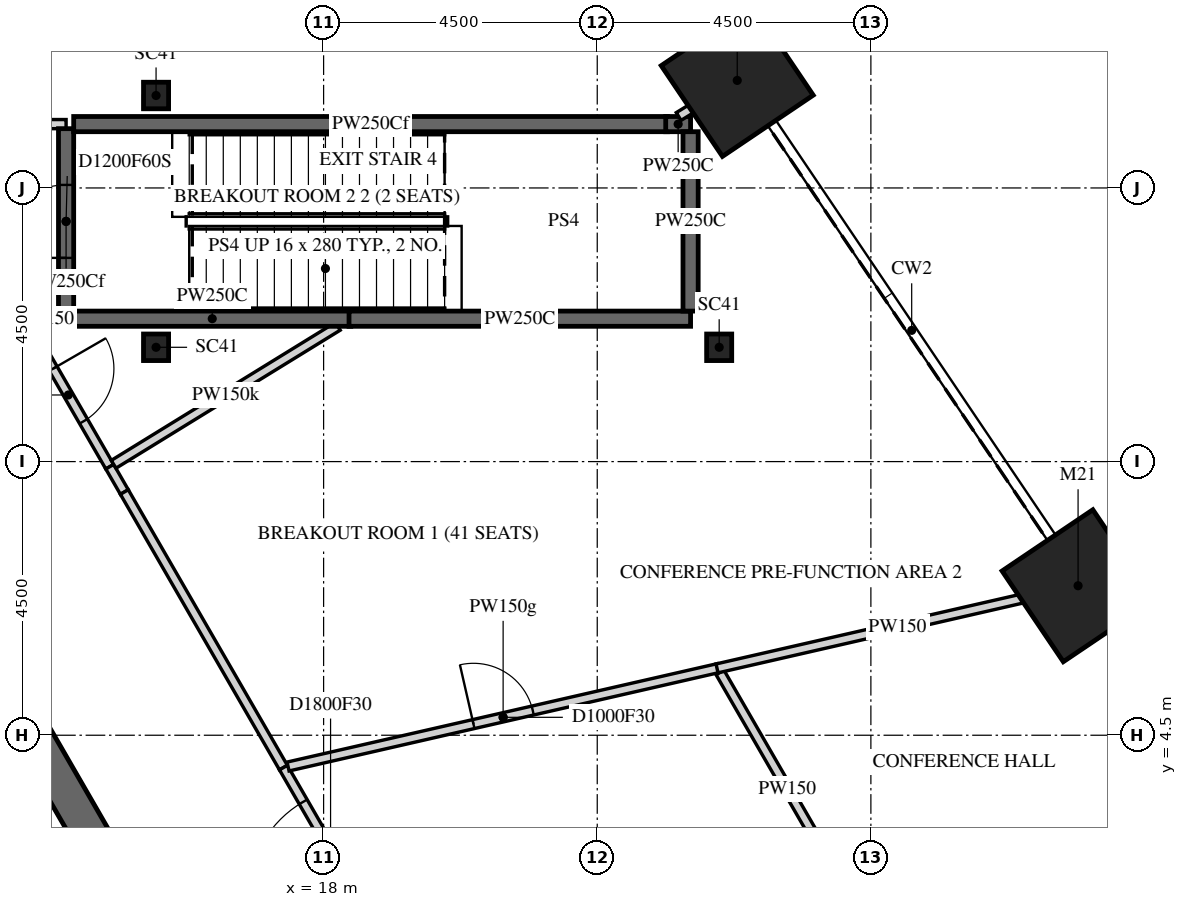
"""IFC4 building model, lengths in metres.
Left out: names, types, materials, properties, quantities, classifications, styles, units other than length and angle.
Written with IfcOpenShell. Run it as: python <this file> out.ifc"""

import sys

from ifc_helpers import new_model, si_unit, direction, frame, frame_2d, origin, origin_2d, place, context, subcontext, project, spatial, polyline, rectangle, i_section, outline, extrude, element, fill, save


model = new_model("IFC4")
c1 = context("Model", 3, precision=1e-05, world=origin(), true_north=direction((0.0, 1.0)))
c2 = subcontext(c1, "Body", "Model", "MODEL_VIEW")
j1 = project(units=[si_unit("LENGTHUNIT", "METRE"), si_unit("PLANEANGLEUNIT", "RADIAN")], contexts=[c1])
p1 = place(None, origin())
s1 = spatial("IfcSite", under=j1, at=p1, CompositionType="ELEMENT")
p2 = place(p1, origin())
s2 = spatial("IfcBuilding", under=s1, at=p2, CompositionType="ELEMENT")
p3 = place(p2, frame((0.0, 0.0, 20.5)))
s3 = spatial("IfcBuildingStorey", under=s2, at=p3, CompositionType="ELEMENT", Elevation=20.5)
for number, where, z_axis, x_axis in (
    (1, (30.407, 6.958, -0.25), (0.0, 0.0, 1.0), (0.559, -0.829, 0.0)),
    (2, (24.802, 15.269, -0.25), (0.0, 0.0, 1.0), (0.559, -0.829, 0.0)),
):
    element("IfcColumn", number, at=place(p3, frame(where, z_axis=z_axis, x_axis=x_axis)), inside=s3, PredefinedType="COLUMN", context=c2, shape_type="SweptSolid", body=[
        extrude(rectangle(XDim=1.8, YDim=1.8, at=origin_2d()), origin(), (0.0, 0.0, 1.0), 5.5),
    ])
for number, where, z_axis, x_axis in (
    (3, (24.505, 10.88, -0.25), (0.0, 0.0, 1.0), (1.0, 0.0, 0.0)),
    (4, (15.245, 10.88, -0.25), (0.0, 0.0, 1.0), (1.0, 0.0, 0.0)),
    (5, (15.245, 15.02, -0.25), (0.0, 0.0, 1.0), (1.0, 0.0, 0.0)),
):
    element("IfcColumn", number, at=place(p3, frame(where, z_axis=z_axis, x_axis=x_axis)), inside=s3, PredefinedType="COLUMN", context=c2, shape_type="SweptSolid", body=[
        extrude(i_section(OverallWidth=0.412, OverallDepth=0.437, WebThickness=0.036, FlangeThickness=0.058, FilletRadius=0.015, at=origin_2d()), origin(), (0.0, 0.0, 1.0), 5.5),
    ])
p4 = place(p3, frame((15.819, 0.0, -0.25), z_axis=(0.0, 0.0, 1.0), x_axis=(-0.499999880136, 0.866025472988, 0.0)))
e6 = element("IfcWall", 6, at=p4, inside=s3, PredefinedType="SHEAR", context=c2, shape_type="SweptSolid", body=[
    extrude(outline(polyline([(-0.173, -0.3), (15.993, -0.3), (15.646, 0.3), (0.173, 0.3), (-0.173, -0.3)])), origin(), (0.0, 0.0, 1.0), 5.5),
])
p5 = place(p4, frame((6.981, 0.0, 0.25)))
e7 = element("IfcOpeningElement", 7, at=p5, cuts=e6, PredefinedType="OPENING", context=c2, shape_type="SweptSolid", body=[
    extrude(rectangle(XDim=1.8, YDim=2.4, at=frame_2d((0.9, 1.2))), frame((0.0, 0.31, 0.0), z_axis=(0.0, -1.0, 0.0), x_axis=(1.0, 0.0, 0.0)), (0.0, 0.0, 1.0), 0.62),
])
p6 = place(p3, frame((11.836, 14.55, 0.0), z_axis=(0.0, 0.0, 1.0), x_axis=(1.0, 0.0, 0.0)))
e8 = element("IfcWall", 8, at=p6, inside=s3, PredefinedType="PARTITIONING", context=c2, shape_type="SweptSolid", body=[
    extrude(rectangle(XDim=1.929, YDim=0.15, at=frame_2d((0.964, 0.0))), origin(), (0.0, 0.0, 1.0), 5.25),
])
p7 = place(p6, frame((0.465, 0.0, 0.0)))
e9 = element("IfcOpeningElement", 9, at=p7, cuts=e8, PredefinedType="OPENING", context=c2, shape_type="SweptSolid", body=[
    extrude(rectangle(XDim=1.0, YDim=2.1, at=frame_2d((0.5, 1.05))), frame((0.0, 0.085, 0.0), z_axis=(0.0, -1.0, 0.0), x_axis=(1.0, 0.0, 0.0)), (0.0, 0.0, 1.0), 0.17),
])
p8 = place(p3, frame((13.765, 11.35, 0.0), z_axis=(0.0, 0.0, 1.0), x_axis=(-1.0, 0.0, 0.0)))
e10 = element("IfcWall", 10, at=p8, inside=s3, PredefinedType="PARTITIONING", context=c2, shape_type="SweptSolid", body=[
    extrude(rectangle(XDim=0.688, YDim=0.15, at=frame_2d((0.344, 0.0))), origin(), (0.0, 0.0, 1.0), 5.25),
])
p9 = place(p3, frame((13.765, 11.425, 0.0), z_axis=(0.0, 0.0, 1.0), x_axis=(0.0, 1.0, 0.0)))
e11 = element("IfcWall", 11, at=p9, inside=s3, PredefinedType="PARTITIONING", context=c2, shape_type="SweptSolid", body=[
    extrude(rectangle(XDim=3.05, YDim=0.25, at=frame_2d((1.525, 0.0))), origin(), (0.0, 0.0, 1.0), 4.496),
])
p10 = place(p9, frame((0.925, 0.0, 0.0)))
e12 = element("IfcOpeningElement", 12, at=p10, cuts=e11, PredefinedType="OPENING", context=c2, shape_type="SweptSolid", body=[
    extrude(rectangle(XDim=1.2, YDim=2.1, at=frame_2d((0.6, 1.05))), frame((0.0, 0.135, 0.0), z_axis=(0.0, -1.0, 0.0), x_axis=(1.0, 0.0, 0.0)), (0.0, 0.0, 1.0), 0.27),
])
p11 = place(p3, frame((13.89, 14.55, 0.0), z_axis=(0.0, 0.0, 1.0), x_axis=(1.0, 0.0, 0.0)))
e13 = element("IfcWall", 13, at=p11, inside=s3, PredefinedType="PARTITIONING", context=c2, shape_type="SweptSolid", body=[
    extrude(rectangle(XDim=9.765, YDim=0.25, at=frame_2d((4.883, 0.0))), origin(), (0.0, 0.0, 1.0), 4.496),
])
p12 = place(p3, frame((13.12, 11.275, 0.0), z_axis=(0.0, 0.0, 1.0), x_axis=(0.500177554253, -0.865922868517, 0.0)))
e14 = element("IfcWall", 14, at=p12, inside=s3, PredefinedType="PARTITIONING", context=c2, shape_type="SweptSolid", body=[
    extrude(rectangle(XDim=2.724, YDim=0.15, at=frame_2d((1.362, 0.0))), origin(), (0.0, 0.0, 1.0), 5.25),
])
p13 = place(p12, frame((0.862, 0.0, 0.0)))
e15 = element("IfcOpeningElement", 15, at=p13, cuts=e14, PredefinedType="OPENING", context=c2, shape_type="SweptSolid", body=[
    extrude(rectangle(XDim=1.0, YDim=2.1, at=frame_2d((0.5, 1.05))), frame((0.0, 0.085, 0.0), z_axis=(0.0, -1.0, 0.0), x_axis=(1.0, 0.0, 0.0)), (0.0, 0.0, 1.0), 0.17),
])
p14 = place(p3, frame((14.723, 8.5, 0.0), z_axis=(0.0, 0.0, 1.0), x_axis=(-0.499693115345, 0.866202511239, 0.0)))
e16 = element("IfcWall", 16, at=p14, inside=s3, PredefinedType="PARTITIONING", context=c2, shape_type="SweptSolid", body=[
    extrude(rectangle(XDim=0.48, YDim=0.15, at=frame_2d((0.24, 0.0))), origin(), (0.0, 0.0, 1.0), 5.25),
])
p15 = place(p3, frame((17.339, 3.968, 0.0), z_axis=(0.0, 0.0, 1.0), x_axis=(-0.499952654668, 0.866052736899, 0.0)))
e17 = element("IfcWall", 17, at=p15, inside=s3, PredefinedType="PARTITIONING", context=c2, shape_type="SweptSolid", body=[
    extrude(rectangle(XDim=5.233, YDim=0.15, at=frame_2d((2.616, 0.0))), origin(), (0.0, 0.0, 1.0), 5.25),
])
p16 = place(p3, frame((18.234, 11.225, 0.0), z_axis=(0.0, 0.0, 1.0), x_axis=(-0.851571181887, -0.524238993379, 0.0)))
e18 = element("IfcWall", 18, at=p16, inside=s3, PredefinedType="PARTITIONING", context=c2, shape_type="SweptSolid", body=[
    extrude(rectangle(XDim=4.33, YDim=0.15, at=frame_2d((2.165, 0.0))), origin(), (0.0, 0.0, 1.0), 4.323),
])
p17 = place(p3, frame((18.447, 11.35, 0.0), z_axis=(0.0, 0.0, 1.0), x_axis=(-1.0, 0.0, 0.0)))
e19 = element("IfcWall", 19, at=p17, inside=s3, PredefinedType="PARTITIONING", context=c2, shape_type="SweptSolid", body=[
    extrude(rectangle(XDim=4.557, YDim=0.25, at=frame_2d((2.279, 0.0))), origin(), (0.0, 0.0, 1.0), 5.25),
])
p18 = place(p3, frame((18.721, 1.575, 0.0), z_axis=(0.0, 0.0, 1.0), x_axis=(-0.500053847239, 0.865994312834, 0.0)))
e20 = element("IfcWall", 20, at=p18, inside=s3, PredefinedType="PARTITIONING", context=c2, shape_type="SweptSolid", body=[
    extrude(rectangle(XDim=2.763, YDim=0.15, at=frame_2d((1.382, 0.0))), origin(), (0.0, 0.0, 1.0), 5.25),
])
p19 = place(p18, frame((0.313, 0.0, 0.0)))
e21 = element("IfcOpeningElement", 21, at=p19, cuts=e20, PredefinedType="OPENING", context=c2, shape_type="SweptSolid", body=[
    extrude(rectangle(XDim=1.8, YDim=2.1, at=frame_2d((0.9, 1.05))), frame((0.0, 0.085, 0.0), z_axis=(0.0, -1.0, 0.0), x_axis=(1.0, 0.0, 0.0)), (0.0, 0.0, 1.0), 0.17),
])
p20 = place(p3, frame((19.197, 23.578, 0.0), z_axis=(0.0, 0.0, 1.0), x_axis=(-0.631417805909, -0.775442811805, 0.0)))
e22 = element("IfcWall", 22, at=p20, inside=s3, PredefinedType="PARTITIONING", context=c2, shape_type="SweptSolid", body=[
    extrude(rectangle(XDim=11.545, YDim=0.15, at=frame_2d((5.773, 0.0))), origin(), (0.0, 0.0, 1.0), 5.25),
])
p21 = place(p3, frame((23.626, 14.55, 0.0), z_axis=(0.0, 0.0, 1.0), x_axis=(1.0, 0.0, 0.0)))
e23 = element("IfcWall", 23, at=p21, inside=s3, PredefinedType="PARTITIONING", context=c2, shape_type="SweptSolid", body=[
    extrude(rectangle(XDim=0.409, YDim=0.25, at=frame_2d((0.205, 0.0))), origin(), (0.0, 0.0, 1.0), 5.25),
])
p22 = place(p3, frame((24.035, 11.35, 0.0), z_axis=(0.0, 0.0, 1.0), x_axis=(-1.0, 0.0, 0.0)))
e24 = element("IfcWall", 24, at=p22, inside=s3, PredefinedType="PARTITIONING", context=c2, shape_type="SweptSolid", body=[
    extrude(rectangle(XDim=5.617, YDim=0.25, at=frame_2d((2.809, 0.0))), origin(), (0.0, 0.0, 1.0), 5.25),
])
p23 = place(p3, frame((24.035, 14.425, 0.0), z_axis=(0.0, 0.0, 1.0), x_axis=(0.0, -1.0, 0.0)))
e25 = element("IfcWall", 25, at=p23, inside=s3, PredefinedType="PARTITIONING", context=c2, shape_type="SweptSolid", body=[
    extrude(rectangle(XDim=2.95, YDim=0.25, at=frame_2d((1.475, 0.0))), origin(), (0.0, 0.0, 1.0), 5.25),
])
p24 = place(p3, frame((24.518, 5.534, 0.0), z_axis=(0.0, 0.0, 1.0), x_axis=(0.500012051057, -0.866018445991, 0.0)))
e26 = element("IfcWall", 26, at=p24, inside=s3, PredefinedType="PARTITIONING", context=c2, shape_type="SweptSolid", body=[
    extrude(rectangle(XDim=4.427, YDim=0.15, at=frame_2d((2.214, 0.0))), origin(), (0.0, 0.0, 1.0), 5.25),
])
p25 = place(p3, frame((17.416, 3.986, 0.0), z_axis=(0.0, 0.0, 1.0), x_axis=(0.974810247243, 0.223035830911, 0.0)))
e27 = element("IfcWall", 27, at=p25, inside=s3, PredefinedType="PARTITIONING", context=c2, shape_type="SweptSolid", body=[
    extrude(rectangle(XDim=7.256, YDim=0.15, at=frame_2d((3.628, 0.0))), origin(), (0.0, 0.0, 1.0), 4.488),
])
p26 = place(p25, frame((3.128, 0.0, 0.0)))
e28 = element("IfcOpeningElement", 28, at=p26, cuts=e27, PredefinedType="OPENING", context=c2, shape_type="SweptSolid", body=[
    extrude(rectangle(XDim=1.0, YDim=2.1, at=frame_2d((0.5, 1.05))), frame((0.0, 0.085, 0.0), z_axis=(0.0, -1.0, 0.0), x_axis=(1.0, 0.0, 0.0)), (0.0, 0.0, 1.0), 0.17),
])
p27 = place(p3, frame((24.802, 15.268, 0.0), z_axis=(0.0, 0.0, 1.0), x_axis=(-0.851472949554, -0.524398528009, 0.0)))
e29 = element("IfcWall", 29, at=p27, inside=s3, PredefinedType="PARTITIONING", context=c2, shape_type="SweptSolid", body=[
    extrude(rectangle(XDim=1.131, YDim=0.15, at=frame_2d((0.565, 0.0))), origin(), (0.0, 0.0, 1.0), 4.323),
])
p28 = place(p3, frame((30.407, 6.958, 0.0), z_axis=(0.0, 0.0, 1.0), x_axis=(-0.97479228721, -0.223114313291, 0.0)))
e30 = element("IfcWall", 30, at=p28, inside=s3, PredefinedType="PARTITIONING", context=c2, shape_type="SweptSolid", body=[
    extrude(rectangle(XDim=6.091, YDim=0.15, at=frame_2d((3.045, 0.0))), origin(), (0.0, 0.0, 1.0), 5.25),
])
p29 = place(p10, origin())
e31 = element("IfcDoor", 31, at=p29, inside=s3, OperationType="SINGLE_SWING_LEFT", PredefinedType="DOOR", context=c2, shape_type="SweptSolid", body=[
    extrude(rectangle(XDim=1.2, YDim=2.1, at=frame_2d((0.6, 1.05))), frame((0.0, 0.025, 0.0), z_axis=(0.0, -1.0, 0.0), x_axis=(1.0, 0.0, 0.0)), (0.0, 0.0, 1.0), 0.05),
])
fill(e12, e31)
p30 = place(p13, origin())
e32 = element("IfcDoor", 32, at=p30, inside=s3, OperationType="SINGLE_SWING_RIGHT", PredefinedType="DOOR", context=c2, shape_type="SweptSolid", body=[
    extrude(rectangle(XDim=1.0, YDim=2.1, at=frame_2d((0.5, 1.05))), frame((0.0, 0.025, 0.0), z_axis=(0.0, -1.0, 0.0), x_axis=(1.0, 0.0, 0.0)), (0.0, 0.0, 1.0), 0.05),
])
fill(e15, e32)
p31 = place(p19, origin())
e33 = element("IfcDoor", 33, at=p31, inside=s3, OperationType="DOUBLE_DOOR_SINGLE_SWING", PredefinedType="DOOR", context=c2, shape_type="SweptSolid", body=[
    extrude(rectangle(XDim=1.8, YDim=2.1, at=frame_2d((0.9, 1.05))), frame((0.0, 0.025, 0.0), z_axis=(0.0, -1.0, 0.0), x_axis=(1.0, 0.0, 0.0)), (0.0, 0.0, 1.0), 0.05),
])
fill(e21, e33)
p32 = place(p26, origin())
e34 = element("IfcDoor", 34, at=p32, inside=s3, OperationType="SINGLE_SWING_LEFT", PredefinedType="DOOR", context=c2, shape_type="SweptSolid", body=[
    extrude(rectangle(XDim=1.0, YDim=2.1, at=frame_2d((0.5, 1.05))), frame((0.0, 0.025, 0.0), z_axis=(0.0, -1.0, 0.0), x_axis=(1.0, 0.0, 0.0)), (0.0, 0.0, 1.0), 0.05),
])
fill(e28, e34)
save(model, sys.argv[1])
